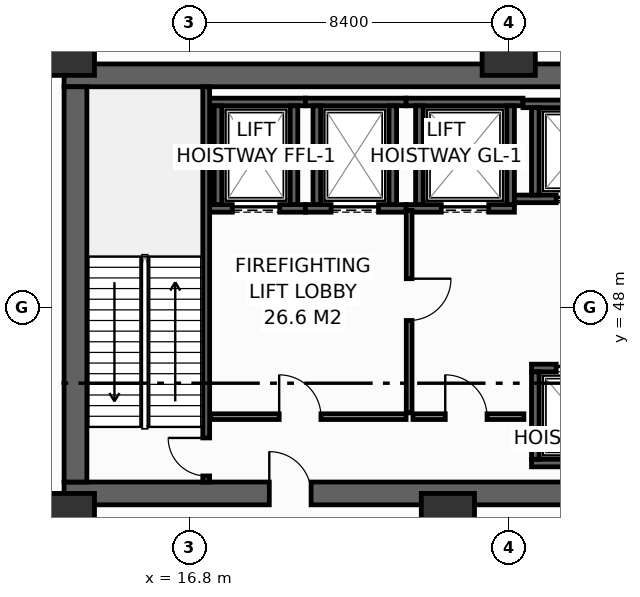
"""IFC4 building model, lengths in metres.
Left out: names, types, materials, properties, quantities, classifications, styles, units other than length and angle.
Written with IfcOpenShell. Run it as: python <this file> out.ifc"""

import sys

from ifc_helpers import new_model, si_unit, direction, frame, frame_2d, origin, origin_2d, place, context, subcontext, project, spatial, rectangle, hollow_rectangle, extrude, element, fill, save


model = new_model("IFC4")
c1 = context("Model", 3, precision=1e-05, world=origin(), true_north=direction((0.0, 1.0)))
c2 = subcontext(c1, "Body", "Model", "MODEL_VIEW")
j1 = project(units=[si_unit("LENGTHUNIT", "METRE"), si_unit("PLANEANGLEUNIT", "RADIAN")], contexts=[c1])
p1 = place(None, origin())
s1 = spatial("IfcSite", under=j1, at=p1, CompositionType="ELEMENT")
p2 = place(p1, origin())
s2 = spatial("IfcBuilding", under=s1, at=p2, CompositionType="ELEMENT")
p3 = place(p2, origin())
s3 = spatial("IfcBuildingStorey", under=s2, at=p3, CompositionType="ELEMENT", Elevation=0.0)
p4 = place(p3, frame((13.5, 43.1, 0.0), z_axis=(0.0, 0.0, 1.0), x_axis=(1.0, 0.0, 0.0)))
e1 = element("IfcWall", 1, at=p4, inside=s3, PredefinedType="SHEAR", context=c2, shape_type="SweptSolid", body=[
    extrude(rectangle(XDim=32.9, YDim=0.6, at=frame_2d((16.45, 0.0))), origin(), (0.0, 0.0, 1.0), 5.7),
])
p5 = place(p4, frame((5.4, 0.0, 0.0)))
e2 = element("IfcOpeningElement", 2, at=p5, cuts=e1, PredefinedType="OPENING", context=c2, shape_type="SweptSolid", body=[
    extrude(rectangle(XDim=1.1, YDim=2.15, at=frame_2d((0.55, 1.075))), frame((0.0, 0.31, 0.0), z_axis=(0.0, -1.0, 0.0), x_axis=(1.0, 0.0, 0.0)), (0.0, 0.0, 1.0), 0.62),
])
p6 = place(p4, frame((25.6, 0.0, 0.0)))
e3 = element("IfcOpeningElement", 3, at=p6, cuts=e1, PredefinedType="OPENING", context=c2, shape_type="SweptSolid", body=[
    extrude(rectangle(XDim=1.1, YDim=2.15, at=frame_2d((0.55, 1.075))), frame((0.0, 0.31, 0.0), z_axis=(0.0, -1.0, 0.0), x_axis=(1.0, 0.0, 0.0)), (0.0, 0.0, 1.0), 0.62),
])
p7 = place(p3, frame((13.5, 54.1, 0.0), z_axis=(0.0, 0.0, 1.0), x_axis=(1.0, 0.0, 0.0)))
e4 = element("IfcWall", 4, at=p7, inside=s3, PredefinedType="SHEAR", context=c2, shape_type="SweptSolid", body=[
    extrude(rectangle(XDim=32.9, YDim=0.6, at=frame_2d((16.45, 0.0))), origin(), (0.0, 0.0, 1.0), 5.7),
])
p8 = place(p3, frame((13.8, 43.4, 0.0), z_axis=(0.0, 0.0, 1.0), x_axis=(0.0, 1.0, 0.0)))
e5 = element("IfcWall", 5, at=p8, inside=s3, PredefinedType="SHEAR", context=c2, shape_type="SweptSolid", body=[
    extrude(rectangle(XDim=10.4, YDim=0.6, at=frame_2d((5.2, 0.0))), origin(), (0.0, 0.0, 1.0), 5.7),
])
for number, where, z_axis, x_axis in (
    (6, (13.6, 54.8, 0.0), (0.0, 0.0, 1.0), (1.0, 0.0, 0.0)),
    (7, (25.2, 54.8, 0.0), (0.0, 0.0, 1.0), (1.0, 0.0, 0.0)),
    (8, (13.6, 42.4, 0.0), (0.0, 0.0, 1.0), (1.0, 0.0, 0.0)),
    (9, (23.6, 42.4, 0.0), (0.0, 0.0, 1.0), (1.0, 0.0, 0.0)),
):
    element("IfcColumn", number, at=place(p3, frame(where, z_axis=z_axis, x_axis=x_axis)), inside=s3, PredefinedType="COLUMN", context=c2, shape_type="SweptSolid", body=[
        extrude(hollow_rectangle(XDim=1.4, YDim=1.4, WallThickness=0.065, at=origin_2d()), origin(), (0.0, 0.0, 1.0), 6.0),
    ])
p9 = place(p3, frame((17.33, 50.6, 0.0), z_axis=(0.0, 0.0, 1.0), x_axis=(1.0, 0.0, 0.0)))
e10 = element("IfcWall", 10, at=p9, inside=s3, PredefinedType="SHEAR", context=c2, shape_type="SweptSolid", body=[
    extrude(rectangle(XDim=2.52, YDim=0.2, at=frame_2d((1.26, 0.0))), origin(), (0.0, 0.0, 1.0), 5.7),
])
p10 = place(p9, frame((0.595, 0.0, 0.0)))
e11 = element("IfcOpeningElement", 11, at=p10, cuts=e10, PredefinedType="OPENING", context=c2, shape_type="SweptSolid", body=[
    extrude(rectangle(XDim=1.25, YDim=2.3, at=frame_2d((0.625, 1.15))), frame((0.0, 0.11, 0.0), z_axis=(0.0, -1.0, 0.0), x_axis=(1.0, 0.0, 0.0)), (0.0, 0.0, 1.0), 0.22),
])
p11 = place(p3, frame((17.33, 53.4, 0.0), z_axis=(0.0, 0.0, 1.0), x_axis=(1.0, 0.0, 0.0)))
e12 = element("IfcWall", 12, at=p11, inside=s3, PredefinedType="SHEAR", context=c2, shape_type="SweptSolid", body=[
    extrude(rectangle(XDim=2.52, YDim=0.2, at=frame_2d((1.26, 0.0))), origin(), (0.0, 0.0, 1.0), 5.7),
])
for number, where, z_axis, x_axis in (
    (13, (17.55, 50.7, 0.0), (0.0, 0.0, 1.0), (0.0, 1.0, 0.0)),
    (14, (19.55, 50.7, 0.0), (0.0, 0.0, 1.0), (0.0, 1.0, 0.0)),
):
    element("IfcWall", number, at=place(p3, frame(where, z_axis=z_axis, x_axis=x_axis)), inside=s3, PredefinedType="SHEAR", context=c2, shape_type="SweptSolid", body=[
        extrude(rectangle(XDim=2.6, YDim=0.2, at=frame_2d((1.3, 0.0))), origin(), (0.0, 0.0, 1.0), 5.7),
    ])
p12 = place(p3, frame((19.85, 50.6, 0.0), z_axis=(0.0, 0.0, 1.0), x_axis=(1.0, 0.0, 0.0)))
e15 = element("IfcWall", 15, at=p12, inside=s3, PredefinedType="SHEAR", context=c2, shape_type="SweptSolid", body=[
    extrude(rectangle(XDim=2.65, YDim=0.2, at=frame_2d((1.325, 0.0))), origin(), (0.0, 0.0, 1.0), 5.7),
])
p13 = place(p12, frame((0.675, 0.0, 0.0)))
e16 = element("IfcOpeningElement", 16, at=p13, cuts=e15, PredefinedType="OPENING", context=c2, shape_type="SweptSolid", body=[
    extrude(rectangle(XDim=1.25, YDim=2.3, at=frame_2d((0.625, 1.15))), frame((0.0, 0.11, 0.0), z_axis=(0.0, -1.0, 0.0), x_axis=(1.0, 0.0, 0.0)), (0.0, 0.0, 1.0), 0.22),
])
p14 = place(p3, frame((19.85, 53.4, 0.0), z_axis=(0.0, 0.0, 1.0), x_axis=(1.0, 0.0, 0.0)))
e17 = element("IfcWall", 17, at=p14, inside=s3, PredefinedType="SHEAR", context=c2, shape_type="SweptSolid", body=[
    extrude(rectangle(XDim=2.65, YDim=0.2, at=frame_2d((1.325, 0.0))), origin(), (0.0, 0.0, 1.0), 5.7),
])
for number, where, z_axis, x_axis in (
    (18, (20.15, 50.7, 0.0), (0.0, 0.0, 1.0), (0.0, 1.0, 0.0)),
    (19, (22.15, 50.7, 0.0), (0.0, 0.0, 1.0), (0.0, 1.0, 0.0)),
):
    element("IfcWall", number, at=place(p3, frame(where, z_axis=z_axis, x_axis=x_axis)), inside=s3, PredefinedType="SHEAR", context=c2, shape_type="SweptSolid", body=[
        extrude(rectangle(XDim=2.6, YDim=0.2, at=frame_2d((1.3, 0.0))), origin(), (0.0, 0.0, 1.0), 5.7),
    ])
p15 = place(p3, frame((22.5, 50.6, 0.0), z_axis=(0.0, 0.0, 1.0), x_axis=(1.0, 0.0, 0.0)))
e20 = element("IfcWall", 20, at=p15, inside=s3, PredefinedType="SHEAR", context=c2, shape_type="SweptSolid", body=[
    extrude(rectangle(XDim=2.85, YDim=0.2, at=frame_2d((1.425, 0.0))), origin(), (0.0, 0.0, 1.0), 5.7),
])
p16 = place(p15, frame((0.925, 0.0, 0.0)))
e21 = element("IfcOpeningElement", 21, at=p16, cuts=e20, PredefinedType="OPENING", context=c2, shape_type="SweptSolid", body=[
    extrude(rectangle(XDim=1.25, YDim=2.3, at=frame_2d((0.625, 1.15))), frame((0.0, 0.11, 0.0), z_axis=(0.0, -1.0, 0.0), x_axis=(1.0, 0.0, 0.0)), (0.0, 0.0, 1.0), 0.22),
])
p17 = place(p3, frame((22.5, 53.4, 0.0), z_axis=(0.0, 0.0, 1.0), x_axis=(1.0, 0.0, 0.0)))
e22 = element("IfcWall", 22, at=p17, inside=s3, PredefinedType="SHEAR", context=c2, shape_type="SweptSolid", body=[
    extrude(rectangle(XDim=3.075, YDim=0.2, at=frame_2d((1.538, 0.0))), origin(), (0.0, 0.0, 1.0), 5.7),
])
for number, where, z_axis, x_axis in (
    (23, (22.85, 50.7, 0.0), (0.0, 0.0, 1.0), (0.0, 1.0, 0.0)),
    (24, (25.25, 50.7, 0.0), (0.0, 0.0, 1.0), (0.0, 1.0, 0.0)),
):
    element("IfcWall", number, at=place(p3, frame(where, z_axis=z_axis, x_axis=x_axis)), inside=s3, PredefinedType="SHEAR", context=c2, shape_type="SweptSolid", body=[
        extrude(rectangle(XDim=2.6, YDim=0.2, at=frame_2d((1.3, 0.0))), origin(), (0.0, 0.0, 1.0), 5.7),
    ])
p18 = place(p3, frame((25.35, 50.85, 0.0), z_axis=(0.0, 0.0, 1.0), x_axis=(1.0, 0.0, 0.0)))
e25 = element("IfcWall", 25, at=p18, inside=s3, PredefinedType="SHEAR", context=c2, shape_type="SweptSolid", body=[
    extrude(rectangle(XDim=3.025, YDim=0.2, at=frame_2d((1.512, 0.0))), origin(), (0.0, 0.0, 1.0), 5.7),
])
p19 = place(p18, frame((1.1, 0.0, 0.0)))
e26 = element("IfcOpeningElement", 26, at=p19, cuts=e25, PredefinedType="OPENING", context=c2, shape_type="SweptSolid", body=[
    extrude(rectangle(XDim=1.1, YDim=2.2, at=frame_2d((0.55, 1.1))), frame((0.0, 0.11, 0.0), z_axis=(0.0, -1.0, 0.0), x_axis=(1.0, 0.0, 0.0)), (0.0, 0.0, 1.0), 0.22),
])
p20 = place(p3, frame((25.575, 53.35, 0.0), z_axis=(0.0, 0.0, 1.0), x_axis=(1.0, 0.0, 0.0)))
e27 = element("IfcWall", 27, at=p20, inside=s3, PredefinedType="SHEAR", context=c2, shape_type="SweptSolid", body=[
    extrude(rectangle(XDim=2.8, YDim=0.2, at=frame_2d((1.4, 0.0))), origin(), (0.0, 0.0, 1.0), 5.7),
])
p21 = place(p3, frame((25.9, 50.95, 0.0), z_axis=(0.0, 0.0, 1.0), x_axis=(0.0, 1.0, 0.0)))
e28 = element("IfcWall", 28, at=p21, inside=s3, PredefinedType="SHEAR", context=c2, shape_type="SweptSolid", body=[
    extrude(rectangle(XDim=2.3, YDim=0.2, at=frame_2d((1.15, 0.0))), origin(), (0.0, 0.0, 1.0), 5.7),
])
p22 = place(p3, frame((25.8, 43.9, 0.0), z_axis=(0.0, 0.0, 1.0), x_axis=(1.0, 0.0, 0.0)))
e29 = element("IfcWall", 29, at=p22, inside=s3, PredefinedType="SHEAR", context=c2, shape_type="SweptSolid", body=[
    extrude(rectangle(XDim=2.575, YDim=0.2, at=frame_2d((1.288, 0.0))), origin(), (0.0, 0.0, 1.0), 5.7),
])
p23 = place(p3, frame((25.8, 46.4, 0.0), z_axis=(0.0, 0.0, 1.0), x_axis=(1.0, 0.0, 0.0)))
e30 = element("IfcWall", 30, at=p23, inside=s3, PredefinedType="SHEAR", context=c2, shape_type="SweptSolid", body=[
    extrude(rectangle(XDim=2.575, YDim=0.2, at=frame_2d((1.288, 0.0))), origin(), (0.0, 0.0, 1.0), 5.7),
])
p24 = place(p23, frame((0.65, 0.0, 0.0)))
e31 = element("IfcOpeningElement", 31, at=p24, cuts=e30, PredefinedType="OPENING", context=c2, shape_type="SweptSolid", body=[
    extrude(rectangle(XDim=1.1, YDim=2.2, at=frame_2d((0.55, 1.1))), frame((0.0, 0.11, 0.0), z_axis=(0.0, -1.0, 0.0), x_axis=(1.0, 0.0, 0.0)), (0.0, 0.0, 1.0), 0.22),
])
p25 = place(p3, frame((25.9, 44.0, 0.0), z_axis=(0.0, 0.0, 1.0), x_axis=(0.0, 1.0, 0.0)))
e32 = element("IfcWall", 32, at=p25, inside=s3, PredefinedType="SHEAR", context=c2, shape_type="SweptSolid", body=[
    extrude(rectangle(XDim=2.3, YDim=0.2, at=frame_2d((1.15, 0.0))), origin(), (0.0, 0.0, 1.0), 5.7),
])
p26 = place(p3, frame((17.24, 43.4, 0.0), z_axis=(0.0, 0.0, 1.0), x_axis=(0.0, 1.0, 0.0)))
e33 = element("IfcWall", 33, at=p26, inside=s3, PredefinedType="SHEAR", context=c2, shape_type="SweptSolid", body=[
    extrude(rectangle(XDim=10.4, YDim=0.18, at=frame_2d((5.2, 0.0))), origin(), (0.0, 0.0, 1.0), 5.7),
])
p27 = place(p26, frame((0.16, 0.0, 0.0)))
e34 = element("IfcOpeningElement", 34, at=p27, cuts=e33, PredefinedType="OPENING", context=c2, shape_type="SweptSolid", body=[
    extrude(rectangle(XDim=1.0, YDim=2.15, at=frame_2d((0.5, 1.075))), frame((0.0, 0.1, 0.0), z_axis=(0.0, -1.0, 0.0), x_axis=(1.0, 0.0, 0.0)), (0.0, 0.0, 1.0), 0.2),
])
p28 = place(p3, frame((17.36, 45.12, 0.0), z_axis=(0.0, 0.0, 1.0), x_axis=(1.0, 0.0, 0.0)))
e35 = element("IfcWall", 35, at=p28, inside=s3, PredefinedType="PARTITIONING", context=c2, shape_type="SweptSolid", body=[
    extrude(rectangle(XDim=5.14, YDim=0.15, at=frame_2d((2.57, 0.0))), origin(), (0.0, 0.0, 1.0), 5.7),
])
p29 = place(p28, frame((1.8, 0.0, 0.0)))
e36 = element("IfcOpeningElement", 36, at=p29, cuts=e35, PredefinedType="OPENING", context=c2, shape_type="SweptSolid", body=[
    extrude(rectangle(XDim=1.1, YDim=2.15, at=frame_2d((0.55, 1.075))), frame((0.0, 0.085, 0.0), z_axis=(0.0, -1.0, 0.0), x_axis=(1.0, 0.0, 0.0)), (0.0, 0.0, 1.0), 0.17),
])
p30 = place(p3, frame((22.58, 50.55, 0.0), z_axis=(0.0, 0.0, 1.0), x_axis=(0.0, -1.0, 0.0)))
e37 = element("IfcWall", 37, at=p30, inside=s3, PredefinedType="PARTITIONING", context=c2, shape_type="SweptSolid", body=[
    extrude(rectangle(XDim=5.33, YDim=0.15, at=frame_2d((2.665, 0.0))), origin(), (0.0, 0.0, 1.0), 5.7),
])
p31 = place(p30, frame((1.8, 0.0, 0.0)))
e38 = element("IfcOpeningElement", 38, at=p31, cuts=e37, PredefinedType="OPENING", context=c2, shape_type="SweptSolid", body=[
    extrude(rectangle(XDim=1.1, YDim=2.15, at=frame_2d((0.55, 1.075))), frame((0.0, 0.085, 0.0), z_axis=(0.0, -1.0, 0.0), x_axis=(1.0, 0.0, 0.0)), (0.0, 0.0, 1.0), 0.17),
])
p32 = place(p3, frame((22.68, 45.12, 0.0), z_axis=(0.0, 0.0, 1.0), x_axis=(1.0, 0.0, 0.0)))
e39 = element("IfcWall", 39, at=p32, inside=s3, PredefinedType="PARTITIONING", context=c2, shape_type="SweptSolid", body=[
    extrude(rectangle(XDim=2.92, YDim=0.15, at=frame_2d((1.46, 0.0))), origin(), (0.0, 0.0, 1.0), 5.7),
])
p33 = place(p32, frame((0.85, 0.0, 0.0)))
e40 = element("IfcOpeningElement", 40, at=p33, cuts=e39, PredefinedType="OPENING", context=c2, shape_type="SweptSolid", body=[
    extrude(rectangle(XDim=1.1, YDim=2.15, at=frame_2d((0.55, 1.075))), frame((0.0, 0.085, 0.0), z_axis=(0.0, -1.0, 0.0), x_axis=(1.0, 0.0, 0.0)), (0.0, 0.0, 1.0), 0.17),
])
p34 = place(p10, origin())
e41 = element("IfcDoor", 41, at=p34, inside=s3, OperationType="SLIDING_TO_LEFT", PredefinedType="DOOR", context=c2, shape_type="SweptSolid", body=[
    extrude(rectangle(XDim=1.25, YDim=2.3, at=frame_2d((0.625, 1.15))), frame((0.0, 0.025, 0.0), z_axis=(0.0, -1.0, 0.0), x_axis=(1.0, 0.0, 0.0)), (0.0, 0.0, 1.0), 0.05),
])
fill(e11, e41)
p35 = place(p13, origin())
e42 = element("IfcDoor", 42, at=p35, inside=s3, OperationType="SLIDING_TO_LEFT", PredefinedType="DOOR", context=c2, shape_type="SweptSolid", body=[
    extrude(rectangle(XDim=1.25, YDim=2.3, at=frame_2d((0.625, 1.15))), frame((0.0, 0.025, 0.0), z_axis=(0.0, -1.0, 0.0), x_axis=(1.0, 0.0, 0.0)), (0.0, 0.0, 1.0), 0.05),
])
fill(e16, e42)
p36 = place(p16, origin())
e43 = element("IfcDoor", 43, at=p36, inside=s3, OperationType="SLIDING_TO_LEFT", PredefinedType="DOOR", context=c2, shape_type="SweptSolid", body=[
    extrude(rectangle(XDim=1.25, YDim=2.3, at=frame_2d((0.625, 1.15))), frame((0.0, 0.025, 0.0), z_axis=(0.0, -1.0, 0.0), x_axis=(1.0, 0.0, 0.0)), (0.0, 0.0, 1.0), 0.05),
])
fill(e21, e43)
p37 = place(p19, origin())
e44 = element("IfcDoor", 44, at=p37, inside=s3, OperationType="SLIDING_TO_LEFT", PredefinedType="DOOR", context=c2, shape_type="SweptSolid", body=[
    extrude(rectangle(XDim=1.1, YDim=2.2, at=frame_2d((0.55, 1.1))), frame((0.0, 0.025, 0.0), z_axis=(0.0, -1.0, 0.0), x_axis=(1.0, 0.0, 0.0)), (0.0, 0.0, 1.0), 0.05),
])
fill(e26, e44)
p38 = place(p24, origin())
e45 = element("IfcDoor", 45, at=p38, inside=s3, OperationType="SLIDING_TO_LEFT", PredefinedType="DOOR", context=c2, shape_type="SweptSolid", body=[
    extrude(rectangle(XDim=1.1, YDim=2.2, at=frame_2d((0.55, 1.1))), frame((0.0, 0.025, 0.0), z_axis=(0.0, -1.0, 0.0), x_axis=(1.0, 0.0, 0.0)), (0.0, 0.0, 1.0), 0.05),
])
fill(e31, e45)
p39 = place(p27, origin())
e46 = element("IfcDoor", 46, at=p39, inside=s3, OperationType="SINGLE_SWING_RIGHT", PredefinedType="DOOR", context=c2, shape_type="SweptSolid", body=[
    extrude(rectangle(XDim=1.0, YDim=2.15, at=frame_2d((0.5, 1.075))), frame((0.0, 0.025, 0.0), z_axis=(0.0, -1.0, 0.0), x_axis=(1.0, 0.0, 0.0)), (0.0, 0.0, 1.0), 0.05),
])
fill(e34, e46)
p40 = place(p29, origin())
e47 = element("IfcDoor", 47, at=p40, inside=s3, OperationType="SINGLE_SWING_LEFT", PredefinedType="DOOR", context=c2, shape_type="SweptSolid", body=[
    extrude(rectangle(XDim=1.1, YDim=2.15, at=frame_2d((0.55, 1.075))), frame((0.0, 0.025, 0.0), z_axis=(0.0, -1.0, 0.0), x_axis=(1.0, 0.0, 0.0)), (0.0, 0.0, 1.0), 0.05),
])
fill(e36, e47)
p41 = place(p31, origin())
e48 = element("IfcDoor", 48, at=p41, inside=s3, OperationType="SINGLE_SWING_LEFT", PredefinedType="DOOR", context=c2, shape_type="SweptSolid", body=[
    extrude(rectangle(XDim=1.1, YDim=2.15, at=frame_2d((0.55, 1.075))), frame((0.0, 0.025, 0.0), z_axis=(0.0, -1.0, 0.0), x_axis=(1.0, 0.0, 0.0)), (0.0, 0.0, 1.0), 0.05),
])
fill(e38, e48)
p42 = place(p33, origin())
e49 = element("IfcDoor", 49, at=p42, inside=s3, OperationType="SINGLE_SWING_LEFT", PredefinedType="DOOR", context=c2, shape_type="SweptSolid", body=[
    extrude(rectangle(XDim=1.1, YDim=2.15, at=frame_2d((0.55, 1.075))), frame((0.0, 0.025, 0.0), z_axis=(0.0, -1.0, 0.0), x_axis=(1.0, 0.0, 0.0)), (0.0, 0.0, 1.0), 0.05),
])
fill(e40, e49)
p43 = place(p5, origin())
e50 = element("IfcDoor", 50, at=p43, inside=s3, OperationType="SINGLE_SWING_LEFT", PredefinedType="DOOR", context=c2, shape_type="SweptSolid", body=[
    extrude(rectangle(XDim=1.1, YDim=2.15, at=frame_2d((0.55, 1.075))), frame((0.0, 0.025, 0.0), z_axis=(0.0, -1.0, 0.0), x_axis=(1.0, 0.0, 0.0)), (0.0, 0.0, 1.0), 0.05),
])
fill(e2, e50)
save(model, sys.argv[1])
